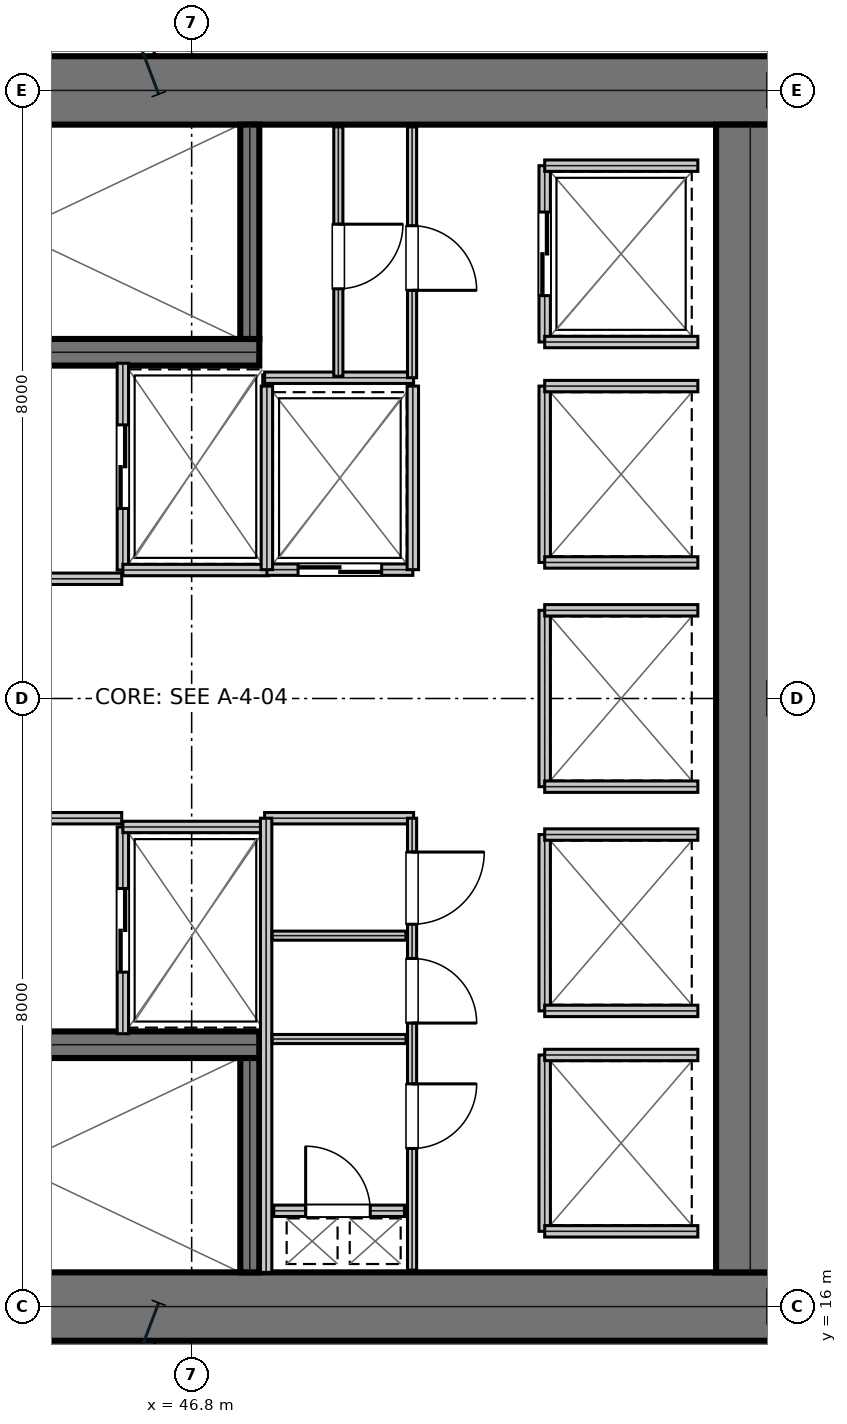
"""IFC4 building model, lengths in metres.
Left out: names, types, materials, properties, quantities, classifications, styles, units other than length and angle.
Written with IfcOpenShell. Run it as: python <this file> out.ifc"""

import sys

from ifc_helpers import new_model, si_unit, direction, frame, frame_2d, origin, place, context, subcontext, project, spatial, rectangle, extrude, element, fill, save


model = new_model("IFC4")
c1 = context("Model", 3, precision=1e-05, world=origin(), true_north=direction((0.0, 1.0)))
c2 = subcontext(c1, "Body", "Model", "MODEL_VIEW")
j1 = project(units=[si_unit("LENGTHUNIT", "METRE"), si_unit("PLANEANGLEUNIT", "RADIAN")], contexts=[c1])
p1 = place(None, origin())
s1 = spatial("IfcSite", under=j1, at=p1, CompositionType="ELEMENT")
p2 = place(p1, origin())
s2 = spatial("IfcBuilding", under=s1, at=p2, CompositionType="ELEMENT")
p3 = place(p2, frame((0.0, 0.0, 45.9)))
s3 = spatial("IfcBuildingStorey", under=s2, at=p3, CompositionType="ELEMENT", Elevation=45.9)
for number, where, z_axis, x_axis in (
    (1, (38.8, 32.0, 0.0), (0.0, 0.0, 1.0), (1.0, 0.0, 0.0)),
    (2, (38.8, 16.0, 0.0), (0.0, 0.0, 1.0), (1.0, 0.0, 0.0)),
):
    element("IfcWall", number, at=place(p3, frame(where, z_axis=z_axis, x_axis=x_axis)), inside=s3, PredefinedType="SHEAR", context=c2, shape_type="SweptSolid", body=[
        extrude(rectangle(XDim=16.0, YDim=0.9, at=frame_2d((8.0, 0.0))), origin(), (0.0, 0.0, 1.0), 3.81),
    ])
p4 = place(p3, frame((54.15, 16.45, 0.0), z_axis=(0.0, 0.0, 1.0), x_axis=(0.0, 1.0, 0.0)))
e3 = element("IfcWall", 3, at=p4, inside=s3, PredefinedType="SHEAR", context=c2, shape_type="SweptSolid", body=[
    extrude(rectangle(XDim=15.1, YDim=0.9, at=frame_2d((7.55, 0.0))), origin(), (0.0, 0.0, 1.0), 3.81),
])
p5 = place(p3, frame((39.98, 28.555, 0.0), z_axis=(0.0, 0.0, 1.0), x_axis=(1.0, 0.0, 0.0)))
e4 = element("IfcWall", 4, at=p5, inside=s3, PredefinedType="SHEAR", context=c2, shape_type="SweptSolid", body=[
    extrude(rectangle(XDim=7.71, YDim=0.35, at=frame_2d((3.855, 0.0))), origin(), (0.0, 0.0, 1.0), 3.81),
])
p6 = place(p5, frame((0.25, 0.0, 0.0)))
e5 = element("IfcOpeningElement", 5, at=p6, cuts=e4, PredefinedType="OPENING", context=c2, shape_type="SweptSolid", body=[
    extrude(rectangle(XDim=1.1, YDim=2.15, at=frame_2d((0.55, 1.075))), frame((0.0, 0.185, 0.0), z_axis=(0.0, -1.0, 0.0), x_axis=(1.0, 0.0, 0.0)), (0.0, 0.0, 1.0), 0.37),
])
p7 = place(p3, frame((39.98, 19.445, 0.0), z_axis=(0.0, 0.0, 1.0), x_axis=(1.0, 0.0, 0.0)))
e6 = element("IfcWall", 6, at=p7, inside=s3, PredefinedType="SHEAR", context=c2, shape_type="SweptSolid", body=[
    extrude(rectangle(XDim=7.71, YDim=0.35, at=frame_2d((3.855, 0.0))), origin(), (0.0, 0.0, 1.0), 3.81),
])
p8 = place(p7, frame((0.25, 0.0, 0.0)))
e7 = element("IfcOpeningElement", 7, at=p8, cuts=e6, PredefinedType="OPENING", context=c2, shape_type="SweptSolid", body=[
    extrude(rectangle(XDim=1.1, YDim=2.15, at=frame_2d((0.55, 1.075))), frame((0.0, 0.185, 0.0), z_axis=(0.0, -1.0, 0.0), x_axis=(1.0, 0.0, 0.0)), (0.0, 0.0, 1.0), 0.37),
])
for number, where, z_axis, x_axis in (
    (8, (47.565, 28.73, 0.0), (0.0, 0.0, 1.0), (0.0, 1.0, 0.0)),
    (9, (47.565, 16.45, 0.0), (0.0, 0.0, 1.0), (0.0, 1.0, 0.0)),
):
    element("IfcWall", number, at=place(p3, frame(where, z_axis=z_axis, x_axis=x_axis)), inside=s3, PredefinedType="SHEAR", context=c2, shape_type="SweptSolid", body=[
        extrude(rectangle(XDim=2.82, YDim=0.25, at=frame_2d((1.41, 0.0))), origin(), (0.0, 0.0, 1.0), 3.81),
    ])
p9 = place(p3, frame((39.98, 25.575, 0.0), z_axis=(0.0, 0.0, 1.0), x_axis=(1.0, 0.0, 0.0)))
e10 = element("IfcWall", 10, at=p9, inside=s3, PredefinedType="PARTITIONING", context=c2, shape_type="SweptSolid", body=[
    extrude(rectangle(XDim=5.9, YDim=0.15, at=frame_2d((2.95, 0.0))), origin(), (0.0, 0.0, 1.0), 3.81),
])
p10 = place(p9, frame((2.35, 0.0, 0.0)))
e11 = element("IfcOpeningElement", 11, at=p10, cuts=e10, PredefinedType="OPENING", context=c2, shape_type="SweptSolid", body=[
    extrude(rectangle(XDim=1.05, YDim=2.15, at=frame_2d((0.525, 1.075))), frame((0.0, 0.085, 0.0), z_axis=(0.0, -1.0, 0.0), x_axis=(1.0, 0.0, 0.0)), (0.0, 0.0, 1.0), 0.17),
])
p11 = place(p3, frame((39.98, 22.425, 0.0), z_axis=(0.0, 0.0, 1.0), x_axis=(1.0, 0.0, 0.0)))
e12 = element("IfcWall", 12, at=p11, inside=s3, PredefinedType="PARTITIONING", context=c2, shape_type="SweptSolid", body=[
    extrude(rectangle(XDim=5.9, YDim=0.15, at=frame_2d((2.95, 0.0))), origin(), (0.0, 0.0, 1.0), 3.81),
])
p12 = place(p11, frame((2.35, 0.0, 0.0)))
e13 = element("IfcOpeningElement", 13, at=p12, cuts=e12, PredefinedType="OPENING", context=c2, shape_type="SweptSolid", body=[
    extrude(rectangle(XDim=1.05, YDim=2.15, at=frame_2d((0.525, 1.075))), frame((0.0, 0.085, 0.0), z_axis=(0.0, -1.0, 0.0), x_axis=(1.0, 0.0, 0.0)), (0.0, 0.0, 1.0), 0.17),
])
p13 = place(p3, frame((45.895, 25.69, 0.0), z_axis=(0.0, 0.0, 1.0), x_axis=(0.0, 1.0, 0.0)))
e14 = element("IfcWall", 14, at=p13, inside=s3, PredefinedType="PARTITIONING", context=c2, shape_type="SweptSolid", body=[
    extrude(rectangle(XDim=2.72, YDim=0.15, at=frame_2d((1.36, 0.0))), origin(), (0.0, 0.0, 1.0), 3.81),
])
p14 = place(p13, frame((0.81, 0.0, 0.0)))
e15 = element("IfcOpeningElement", 15, at=p14, cuts=e14, PredefinedType="OPENING", context=c2, shape_type="SweptSolid", body=[
    extrude(rectangle(XDim=1.1, YDim=2.15, at=frame_2d((0.55, 1.075))), frame((0.0, 0.085, 0.0), z_axis=(0.0, -1.0, 0.0), x_axis=(1.0, 0.0, 0.0)), (0.0, 0.0, 1.0), 0.17),
])
p15 = place(p3, frame((45.895, 25.69, 0.0), z_axis=(0.0, 0.0, 1.0), x_axis=(1.0, 0.0, 0.0)))
e16 = element("IfcWall", 16, at=p15, inside=s3, PredefinedType="PARTITIONING", context=c2, shape_type="SweptSolid", body=[
    extrude(rectangle(XDim=1.915, YDim=0.15, at=frame_2d((0.958, 0.0))), origin(), (0.0, 0.0, 1.0), 3.81),
])
p16 = place(p3, frame((45.895, 19.59, 0.0), z_axis=(0.0, 0.0, 1.0), x_axis=(0.0, 1.0, 0.0)))
e17 = element("IfcWall", 17, at=p16, inside=s3, PredefinedType="PARTITIONING", context=c2, shape_type="SweptSolid", body=[
    extrude(rectangle(XDim=2.72, YDim=0.15, at=frame_2d((1.36, 0.0))), origin(), (0.0, 0.0, 1.0), 3.81),
])
p17 = place(p16, frame((0.81, 0.0, 0.0)))
e18 = element("IfcOpeningElement", 18, at=p17, cuts=e17, PredefinedType="OPENING", context=c2, shape_type="SweptSolid", body=[
    extrude(rectangle(XDim=1.1, YDim=2.15, at=frame_2d((0.55, 1.075))), frame((0.0, 0.085, 0.0), z_axis=(0.0, -1.0, 0.0), x_axis=(1.0, 0.0, 0.0)), (0.0, 0.0, 1.0), 0.17),
])
p18 = place(p3, frame((45.895, 22.31, 0.0), z_axis=(0.0, 0.0, 1.0), x_axis=(1.0, 0.0, 0.0)))
e19 = element("IfcWall", 19, at=p18, inside=s3, PredefinedType="PARTITIONING", context=c2, shape_type="SweptSolid", body=[
    extrude(rectangle(XDim=1.915, YDim=0.15, at=frame_2d((0.958, 0.0))), origin(), (0.0, 0.0, 1.0), 3.81),
])
p19 = place(p3, frame((47.79, 25.695, 0.0), z_axis=(0.0, 0.0, 1.0), x_axis=(1.0, 0.0, 0.0)))
e20 = element("IfcWall", 20, at=p19, inside=s3, PredefinedType="PARTITIONING", context=c2, shape_type="SweptSolid", body=[
    extrude(rectangle(XDim=1.92, YDim=0.15, at=frame_2d((0.96, 0.0))), origin(), (0.0, 0.0, 1.0), 3.81),
])
p20 = place(p19, frame((0.41, 0.0, 0.0)))
e21 = element("IfcOpeningElement", 21, at=p20, cuts=e20, PredefinedType="OPENING", context=c2, shape_type="SweptSolid", body=[
    extrude(rectangle(XDim=1.1, YDim=2.15, at=frame_2d((0.55, 1.075))), frame((0.0, 0.085, 0.0), z_axis=(0.0, -1.0, 0.0), x_axis=(1.0, 0.0, 0.0)), (0.0, 0.0, 1.0), 0.17),
])
for number, where, z_axis, x_axis in (
    (22, (47.79, 25.695, 0.0), (0.0, 0.0, 1.0), (0.0, 1.0, 0.0)),
    (23, (49.71, 25.695, 0.0), (0.0, 0.0, 1.0), (0.0, 1.0, 0.0)),
):
    element("IfcWall", number, at=place(p3, frame(where, z_axis=z_axis, x_axis=x_axis)), inside=s3, PredefinedType="PARTITIONING", context=c2, shape_type="SweptSolid", body=[
        extrude(rectangle(XDim=2.415, YDim=0.15, at=frame_2d((1.208, 0.0))), origin(), (0.0, 0.0, 1.0), 3.81),
    ])
p21 = place(p3, frame((51.445, 28.69, 0.0), z_axis=(0.0, 0.0, 1.0), x_axis=(0.0, 1.0, 0.0)))
e24 = element("IfcWall", 24, at=p21, inside=s3, PredefinedType="PARTITIONING", context=c2, shape_type="SweptSolid", body=[
    extrude(rectangle(XDim=2.32, YDim=0.15, at=frame_2d((1.16, 0.0))), origin(), (0.0, 0.0, 1.0), 3.81),
])
p22 = place(p21, frame((0.61, 0.0, 0.0)))
e25 = element("IfcOpeningElement", 25, at=p22, cuts=e24, PredefinedType="OPENING", context=c2, shape_type="SweptSolid", body=[
    extrude(rectangle(XDim=1.1, YDim=2.15, at=frame_2d((0.55, 1.075))), frame((0.0, 0.085, 0.0), z_axis=(0.0, -1.0, 0.0), x_axis=(1.0, 0.0, 0.0)), (0.0, 0.0, 1.0), 0.17),
])
for number, where, z_axis, x_axis in (
    (26, (51.445, 28.69, 0.0), (0.0, 0.0, 1.0), (1.0, 0.0, 0.0)),
    (27, (51.445, 31.01, 0.0), (0.0, 0.0, 1.0), (1.0, 0.0, 0.0)),
):
    element("IfcWall", number, at=place(p3, frame(where, z_axis=z_axis, x_axis=x_axis)), inside=s3, PredefinedType="PARTITIONING", context=c2, shape_type="SweptSolid", body=[
        extrude(rectangle(XDim=2.015, YDim=0.15, at=frame_2d((1.007, 0.0))), origin(), (0.0, 0.0, 1.0), 3.81),
    ])
p23 = place(p3, frame((51.445, 25.79, 0.0), z_axis=(0.0, 0.0, 1.0), x_axis=(0.0, 1.0, 0.0)))
e28 = element("IfcWall", 28, at=p23, inside=s3, PredefinedType="PARTITIONING", context=c2, shape_type="SweptSolid", body=[
    extrude(rectangle(XDim=2.32, YDim=0.15, at=frame_2d((1.16, 0.0))), origin(), (0.0, 0.0, 1.0), 3.81),
])
for number, where, z_axis, x_axis in (
    (29, (51.445, 25.79, 0.0), (0.0, 0.0, 1.0), (1.0, 0.0, 0.0)),
    (30, (51.445, 28.11, 0.0), (0.0, 0.0, 1.0), (1.0, 0.0, 0.0)),
):
    element("IfcWall", number, at=place(p3, frame(where, z_axis=z_axis, x_axis=x_axis)), inside=s3, PredefinedType="PARTITIONING", context=c2, shape_type="SweptSolid", body=[
        extrude(rectangle(XDim=2.015, YDim=0.15, at=frame_2d((1.007, 0.0))), origin(), (0.0, 0.0, 1.0), 3.81),
    ])
p24 = place(p3, frame((51.445, 19.89, 0.0), z_axis=(0.0, 0.0, 1.0), x_axis=(0.0, 1.0, 0.0)))
e31 = element("IfcWall", 31, at=p24, inside=s3, PredefinedType="PARTITIONING", context=c2, shape_type="SweptSolid", body=[
    extrude(rectangle(XDim=2.32, YDim=0.15, at=frame_2d((1.16, 0.0))), origin(), (0.0, 0.0, 1.0), 3.81),
])
for number, where, z_axis, x_axis in (
    (32, (51.445, 19.89, 0.0), (0.0, 0.0, 1.0), (1.0, 0.0, 0.0)),
    (33, (51.445, 22.21, 0.0), (0.0, 0.0, 1.0), (1.0, 0.0, 0.0)),
):
    element("IfcWall", number, at=place(p3, frame(where, z_axis=z_axis, x_axis=x_axis)), inside=s3, PredefinedType="PARTITIONING", context=c2, shape_type="SweptSolid", body=[
        extrude(rectangle(XDim=2.015, YDim=0.15, at=frame_2d((1.007, 0.0))), origin(), (0.0, 0.0, 1.0), 3.81),
    ])
p25 = place(p3, frame((51.445, 22.84, 0.0), z_axis=(0.0, 0.0, 1.0), x_axis=(0.0, 1.0, 0.0)))
e34 = element("IfcWall", 34, at=p25, inside=s3, PredefinedType="PARTITIONING", context=c2, shape_type="SweptSolid", body=[
    extrude(rectangle(XDim=2.32, YDim=0.15, at=frame_2d((1.16, 0.0))), origin(), (0.0, 0.0, 1.0), 3.81),
])
for number, where, z_axis, x_axis in (
    (35, (51.445, 22.84, 0.0), (0.0, 0.0, 1.0), (1.0, 0.0, 0.0)),
    (36, (51.445, 25.16, 0.0), (0.0, 0.0, 1.0), (1.0, 0.0, 0.0)),
):
    element("IfcWall", number, at=place(p3, frame(where, z_axis=z_axis, x_axis=x_axis)), inside=s3, PredefinedType="PARTITIONING", context=c2, shape_type="SweptSolid", body=[
        extrude(rectangle(XDim=2.015, YDim=0.15, at=frame_2d((1.007, 0.0))), origin(), (0.0, 0.0, 1.0), 3.81),
    ])
p26 = place(p3, frame((51.445, 16.99, 0.0), z_axis=(0.0, 0.0, 1.0), x_axis=(0.0, 1.0, 0.0)))
e37 = element("IfcWall", 37, at=p26, inside=s3, PredefinedType="PARTITIONING", context=c2, shape_type="SweptSolid", body=[
    extrude(rectangle(XDim=2.32, YDim=0.15, at=frame_2d((1.16, 0.0))), origin(), (0.0, 0.0, 1.0), 3.81),
])
for number, where, z_axis, x_axis in (
    (38, (51.445, 16.99, 0.0), (0.0, 0.0, 1.0), (1.0, 0.0, 0.0)),
    (39, (51.445, 19.31, 0.0), (0.0, 0.0, 1.0), (1.0, 0.0, 0.0)),
):
    element("IfcWall", number, at=place(p3, frame(where, z_axis=z_axis, x_axis=x_axis)), inside=s3, PredefinedType="PARTITIONING", context=c2, shape_type="SweptSolid", body=[
        extrude(rectangle(XDim=2.015, YDim=0.15, at=frame_2d((1.007, 0.0))), origin(), (0.0, 0.0, 1.0), 3.81),
    ])
p27 = place(p3, frame((47.88, 17.26, 0.0), z_axis=(0.0, 0.0, 1.0), x_axis=(1.0, 0.0, 0.0)))
e40 = element("IfcWall", 40, at=p27, inside=s3, PredefinedType="PARTITIONING", context=c2, shape_type="SweptSolid", body=[
    extrude(rectangle(XDim=1.72, YDim=0.15, at=frame_2d((0.86, 0.0))), origin(), (0.0, 0.0, 1.0), 3.81),
])
p28 = place(p27, frame((0.42, 0.0, 0.0)))
e41 = element("IfcOpeningElement", 41, at=p28, cuts=e40, PredefinedType="OPENING", context=c2, shape_type="SweptSolid", body=[
    extrude(rectangle(XDim=0.85, YDim=2.15, at=frame_2d((0.425, 1.075))), frame((0.0, 0.085, 0.0), z_axis=(0.0, -1.0, 0.0), x_axis=(1.0, 0.0, 0.0)), (0.0, 0.0, 1.0), 0.17),
])
p29 = place(p3, frame((47.76, 22.425, 0.0), z_axis=(0.0, 0.0, 1.0), x_axis=(1.0, 0.0, 0.0)))
e42 = element("IfcWall", 42, at=p29, inside=s3, PredefinedType="PARTITIONING", context=c2, shape_type="SweptSolid", body=[
    extrude(rectangle(XDim=1.96, YDim=0.15, at=frame_2d((0.98, 0.0))), origin(), (0.0, 0.0, 1.0), 3.81),
])
p30 = place(p3, frame((47.78, 16.45, 0.0), z_axis=(0.0, 0.0, 1.0), x_axis=(0.0, 1.0, 0.0)))
e43 = element("IfcWall", 43, at=p30, inside=s3, PredefinedType="PARTITIONING", context=c2, shape_type="SweptSolid", body=[
    extrude(rectangle(XDim=5.975, YDim=0.15, at=frame_2d((2.988, 0.0))), origin(), (0.0, 0.0, 1.0), 3.81),
])
for number, where, z_axis, x_axis in (
    (44, (47.86, 19.52, 0.0), (0.0, 0.0, 1.0), (1.0, 0.0, 0.0)),
    (45, (47.86, 20.88, 0.0), (0.0, 0.0, 1.0), (1.0, 0.0, 0.0)),
):
    element("IfcWall", number, at=place(p3, frame(where, z_axis=z_axis, x_axis=x_axis)), inside=s3, PredefinedType="PARTITIONING", context=c2, shape_type="SweptSolid", body=[
        extrude(rectangle(XDim=1.76, YDim=0.12, at=frame_2d((0.88, 0.0))), origin(), (0.0, 0.0, 1.0), 3.81),
    ])
p31 = place(p3, frame((49.7, 16.48, 0.0), z_axis=(0.0, 0.0, 1.0), x_axis=(0.0, 1.0, 0.0)))
e46 = element("IfcWall", 46, at=p31, inside=s3, PredefinedType="PARTITIONING", context=c2, shape_type="SweptSolid", body=[
    extrude(rectangle(XDim=5.945, YDim=0.12, at=frame_2d((2.973, 0.0))), origin(), (0.0, 0.0, 1.0), 3.81),
])
p32 = place(p31, frame((1.6, 0.0, 0.0)))
e47 = element("IfcOpeningElement", 47, at=p32, cuts=e46, PredefinedType="OPENING", context=c2, shape_type="SweptSolid", body=[
    extrude(rectangle(XDim=0.85, YDim=2.15, at=frame_2d((0.425, 1.075))), frame((0.0, 0.07, 0.0), z_axis=(0.0, -1.0, 0.0), x_axis=(1.0, 0.0, 0.0)), (0.0, 0.0, 1.0), 0.14),
])
p33 = place(p31, frame((3.25, 0.0, 0.0)))
e48 = element("IfcOpeningElement", 48, at=p33, cuts=e46, PredefinedType="OPENING", context=c2, shape_type="SweptSolid", body=[
    extrude(rectangle(XDim=0.85, YDim=2.15, at=frame_2d((0.425, 1.075))), frame((0.0, 0.07, 0.0), z_axis=(0.0, -1.0, 0.0), x_axis=(1.0, 0.0, 0.0)), (0.0, 0.0, 1.0), 0.14),
])
p34 = place(p31, frame((4.55, 0.0, 0.0)))
e49 = element("IfcOpeningElement", 49, at=p34, cuts=e46, PredefinedType="OPENING", context=c2, shape_type="SweptSolid", body=[
    extrude(rectangle(XDim=0.95, YDim=2.15, at=frame_2d((0.475, 1.075))), frame((0.0, 0.07, 0.0), z_axis=(0.0, -1.0, 0.0), x_axis=(1.0, 0.0, 0.0)), (0.0, 0.0, 1.0), 0.14),
])
p35 = place(p3, frame((47.76, 28.22, 0.0), z_axis=(0.0, 0.0, 1.0), x_axis=(1.0, 0.0, 0.0)))
e50 = element("IfcWall", 50, at=p35, inside=s3, PredefinedType="PARTITIONING", context=c2, shape_type="SweptSolid", body=[
    extrude(rectangle(XDim=1.96, YDim=0.15, at=frame_2d((0.98, 0.0))), origin(), (0.0, 0.0, 1.0), 3.81),
])
p36 = place(p3, frame((48.73, 28.24, 0.0), z_axis=(0.0, 0.0, 1.0), x_axis=(0.0, 1.0, 0.0)))
e51 = element("IfcWall", 51, at=p36, inside=s3, PredefinedType="PARTITIONING", context=c2, shape_type="SweptSolid", body=[
    extrude(rectangle(XDim=3.28, YDim=0.12, at=frame_2d((1.64, 0.0))), origin(), (0.0, 0.0, 1.0), 3.81),
])
p37 = place(p36, frame((1.15, 0.0, 0.0)))
e52 = element("IfcOpeningElement", 52, at=p37, cuts=e51, PredefinedType="OPENING", context=c2, shape_type="SweptSolid", body=[
    extrude(rectangle(XDim=0.85, YDim=2.15, at=frame_2d((0.425, 1.075))), frame((0.0, 0.07, 0.0), z_axis=(0.0, -1.0, 0.0), x_axis=(1.0, 0.0, 0.0)), (0.0, 0.0, 1.0), 0.14),
])
p38 = place(p3, frame((49.7, 28.22, 0.0), z_axis=(0.0, 0.0, 1.0), x_axis=(0.0, 1.0, 0.0)))
e53 = element("IfcWall", 53, at=p38, inside=s3, PredefinedType="PARTITIONING", context=c2, shape_type="SweptSolid", body=[
    extrude(rectangle(XDim=3.3, YDim=0.12, at=frame_2d((1.65, 0.0))), origin(), (0.0, 0.0, 1.0), 3.81),
])
p39 = place(p38, frame((1.15, 0.0, 0.0)))
e54 = element("IfcOpeningElement", 54, at=p39, cuts=e53, PredefinedType="OPENING", context=c2, shape_type="SweptSolid", body=[
    extrude(rectangle(XDim=0.85, YDim=2.15, at=frame_2d((0.425, 1.075))), frame((0.0, 0.07, 0.0), z_axis=(0.0, -1.0, 0.0), x_axis=(1.0, 0.0, 0.0)), (0.0, 0.0, 1.0), 0.14),
])
p40 = place(p14, frame((1.1, 0.0, 0.0), z_axis=(0.0, 0.0, 1.0), x_axis=(-1.0, 0.0, 0.0)))
e55 = element("IfcDoor", 55, at=p40, inside=s3, OperationType="DOUBLE_DOOR_SLIDING", PredefinedType="DOOR", context=c2, shape_type="SweptSolid", body=[
    extrude(rectangle(XDim=1.1, YDim=2.15, at=frame_2d((0.55, 1.075))), frame((0.0, 0.025, 0.0), z_axis=(0.0, -1.0, 0.0), x_axis=(1.0, 0.0, 0.0)), (0.0, 0.0, 1.0), 0.05),
])
fill(e15, e55)
p41 = place(p17, frame((1.1, 0.0, 0.0), z_axis=(0.0, 0.0, 1.0), x_axis=(-1.0, 0.0, 0.0)))
e56 = element("IfcDoor", 56, at=p41, inside=s3, OperationType="DOUBLE_DOOR_SLIDING", PredefinedType="DOOR", context=c2, shape_type="SweptSolid", body=[
    extrude(rectangle(XDim=1.1, YDim=2.15, at=frame_2d((0.55, 1.075))), frame((0.0, 0.025, 0.0), z_axis=(0.0, -1.0, 0.0), x_axis=(1.0, 0.0, 0.0)), (0.0, 0.0, 1.0), 0.05),
])
fill(e18, e56)
p42 = place(p20, frame((1.1, 0.0, 0.0), z_axis=(0.0, 0.0, 1.0), x_axis=(-1.0, 0.0, 0.0)))
e57 = element("IfcDoor", 57, at=p42, inside=s3, OperationType="DOUBLE_DOOR_SLIDING", PredefinedType="DOOR", context=c2, shape_type="SweptSolid", body=[
    extrude(rectangle(XDim=1.1, YDim=2.15, at=frame_2d((0.55, 1.075))), frame((0.0, 0.025, 0.0), z_axis=(0.0, -1.0, 0.0), x_axis=(1.0, 0.0, 0.0)), (0.0, 0.0, 1.0), 0.05),
])
fill(e21, e57)
p43 = place(p22, frame((1.1, 0.0, 0.0), z_axis=(0.0, 0.0, 1.0), x_axis=(-1.0, 0.0, 0.0)))
e58 = element("IfcDoor", 58, at=p43, inside=s3, OperationType="DOUBLE_DOOR_SLIDING", PredefinedType="DOOR", context=c2, shape_type="SweptSolid", body=[
    extrude(rectangle(XDim=1.1, YDim=2.15, at=frame_2d((0.55, 1.075))), frame((0.0, 0.025, 0.0), z_axis=(0.0, -1.0, 0.0), x_axis=(1.0, 0.0, 0.0)), (0.0, 0.0, 1.0), 0.05),
])
fill(e25, e58)
p44 = place(p28, origin())
e59 = element("IfcDoor", 59, at=p44, inside=s3, OperationType="SINGLE_SWING_LEFT", PredefinedType="TRAPDOOR", context=c2, shape_type="SweptSolid", body=[
    extrude(rectangle(XDim=0.85, YDim=2.15, at=frame_2d((0.425, 1.075))), frame((0.0, 0.025, 0.0), z_axis=(0.0, -1.0, 0.0), x_axis=(1.0, 0.0, 0.0)), (0.0, 0.0, 1.0), 0.05),
])
fill(e41, e59)
p45 = place(p32, frame((0.85, 0.0, 0.0), z_axis=(0.0, 0.0, 1.0), x_axis=(-1.0, 0.0, 0.0)))
e60 = element("IfcDoor", 60, at=p45, inside=s3, OperationType="SINGLE_SWING_LEFT", PredefinedType="DOOR", context=c2, shape_type="SweptSolid", body=[
    extrude(rectangle(XDim=0.85, YDim=2.15, at=frame_2d((0.425, 1.075))), frame((0.0, 0.025, 0.0), z_axis=(0.0, -1.0, 0.0), x_axis=(1.0, 0.0, 0.0)), (0.0, 0.0, 1.0), 0.05),
])
fill(e47, e60)
p46 = place(p33, frame((0.85, 0.0, 0.0), z_axis=(0.0, 0.0, 1.0), x_axis=(-1.0, 0.0, 0.0)))
e61 = element("IfcDoor", 61, at=p46, inside=s3, OperationType="SINGLE_SWING_RIGHT", PredefinedType="DOOR", context=c2, shape_type="SweptSolid", body=[
    extrude(rectangle(XDim=0.85, YDim=2.15, at=frame_2d((0.425, 1.075))), frame((0.0, 0.025, 0.0), z_axis=(0.0, -1.0, 0.0), x_axis=(1.0, 0.0, 0.0)), (0.0, 0.0, 1.0), 0.05),
])
fill(e48, e61)
p47 = place(p34, frame((0.95, 0.0, 0.0), z_axis=(0.0, 0.0, 1.0), x_axis=(-1.0, 0.0, 0.0)))
e62 = element("IfcDoor", 62, at=p47, inside=s3, OperationType="SINGLE_SWING_LEFT", PredefinedType="DOOR", context=c2, shape_type="SweptSolid", body=[
    extrude(rectangle(XDim=0.95, YDim=2.15, at=frame_2d((0.475, 1.075))), frame((0.0, 0.025, 0.0), z_axis=(0.0, -1.0, 0.0), x_axis=(1.0, 0.0, 0.0)), (0.0, 0.0, 1.0), 0.05),
])
fill(e49, e62)
p48 = place(p37, frame((0.85, 0.0, 0.0), z_axis=(0.0, 0.0, 1.0), x_axis=(-1.0, 0.0, 0.0)))
e63 = element("IfcDoor", 63, at=p48, inside=s3, OperationType="SINGLE_SWING_LEFT", PredefinedType="DOOR", context=c2, shape_type="SweptSolid", body=[
    extrude(rectangle(XDim=0.85, YDim=2.15, at=frame_2d((0.425, 1.075))), frame((0.0, 0.025, 0.0), z_axis=(0.0, -1.0, 0.0), x_axis=(1.0, 0.0, 0.0)), (0.0, 0.0, 1.0), 0.05),
])
fill(e52, e63)
p49 = place(p39, frame((0.85, 0.0, 0.0), z_axis=(0.0, 0.0, 1.0), x_axis=(-1.0, 0.0, 0.0)))
e64 = element("IfcDoor", 64, at=p49, inside=s3, OperationType="SINGLE_SWING_RIGHT", PredefinedType="DOOR", context=c2, shape_type="SweptSolid", body=[
    extrude(rectangle(XDim=0.85, YDim=2.15, at=frame_2d((0.425, 1.075))), frame((0.0, 0.025, 0.0), z_axis=(0.0, -1.0, 0.0), x_axis=(1.0, 0.0, 0.0)), (0.0, 0.0, 1.0), 0.05),
])
fill(e54, e64)
save(model, sys.argv[1])
